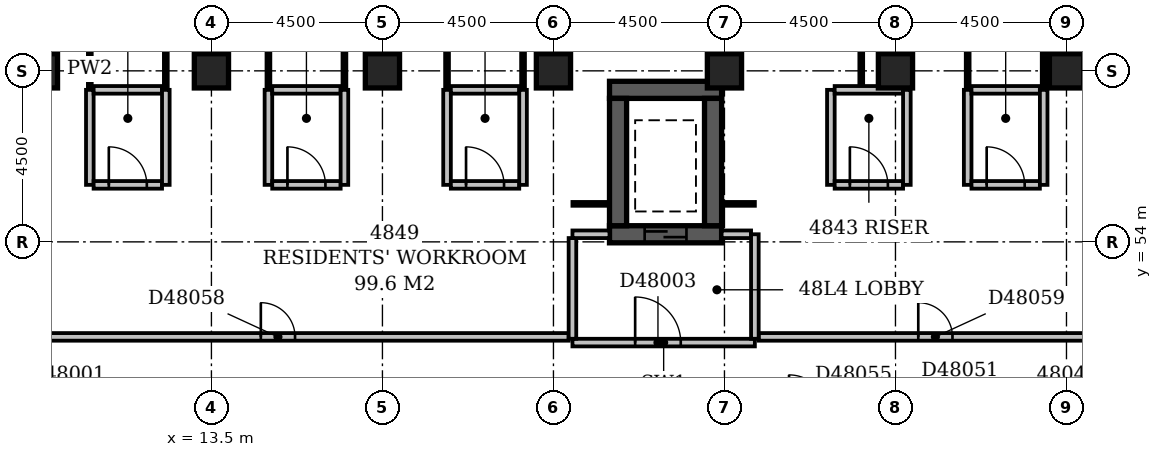
"""IFC4 building model, lengths in metres.
Left out: names, types, materials, properties, quantities, classifications, styles, units other than length and angle.
Written with IfcOpenShell. Run it as: python <this file> out.ifc"""

import sys

from ifc_helpers import new_model, si_unit, direction, frame, frame_2d, origin, origin_2d, place, context, subcontext, project, spatial, rectangle, extrude, element, fill, save


model = new_model("IFC4")
c1 = context("Model", 3, precision=1e-05, world=origin(), true_north=direction((0.0, 1.0)))
c2 = subcontext(c1, "Body", "Model", "MODEL_VIEW")
j1 = project(units=[si_unit("LENGTHUNIT", "METRE"), si_unit("PLANEANGLEUNIT", "RADIAN")], contexts=[c1])
p1 = place(None, origin())
s1 = spatial("IfcSite", under=j1, at=p1, CompositionType="ELEMENT")
p2 = place(p1, origin())
s2 = spatial("IfcBuilding", under=s1, at=p2, CompositionType="ELEMENT")
p3 = place(p2, frame((0.0, 0.0, 189.8)))
s3 = spatial("IfcBuildingStorey", under=s2, at=p3, CompositionType="ELEMENT", Elevation=189.8)
p4 = place(p3, frame((23.975, 54.2, -0.3), z_axis=(0.0, 0.0, 1.0), x_axis=(1.0, 0.0, 0.0)))
e1 = element("IfcWall", 1, at=p4, inside=s3, PredefinedType="SHEAR", context=c2, shape_type="SweptSolid", body=[
    extrude(rectangle(XDim=2.95, YDim=0.45, at=frame_2d((1.475, 0.0))), origin(), (0.0, 0.0, 1.0), 3.6),
])
p5 = place(p4, frame((0.925, 0.0, 0.3)))
e2 = element("IfcOpeningElement", 2, at=p5, cuts=e1, PredefinedType="OPENING", context=c2, shape_type="SweptSolid", body=[
    extrude(rectangle(XDim=1.1, YDim=2.1, at=frame_2d((0.55, 1.05))), frame((0.0, 0.237, 0.0), z_axis=(0.0, -1.0, 0.0), x_axis=(1.0, 0.0, 0.0)), (0.0, 0.0, 1.0), 0.474),
])
p6 = place(p3, frame((23.975, 58.0, -0.3), z_axis=(0.0, 0.0, 1.0), x_axis=(1.0, 0.0, 0.0)))
e3 = element("IfcWall", 3, at=p6, inside=s3, PredefinedType="SHEAR", context=c2, shape_type="SweptSolid", body=[
    extrude(rectangle(XDim=2.95, YDim=0.45, at=frame_2d((1.475, 0.0))), origin(), (0.0, 0.0, 1.0), 3.6),
])
for number, where, z_axis, x_axis in (
    (4, (24.2, 54.425, -0.3), (0.0, 0.0, 1.0), (0.0, 1.0, 0.0)),
    (5, (26.7, 54.425, -0.3), (0.0, 0.0, 1.0), (0.0, 1.0, 0.0)),
):
    element("IfcWall", number, at=place(p3, frame(where, z_axis=z_axis, x_axis=x_axis)), inside=s3, PredefinedType="SHEAR", context=c2, shape_type="SweptSolid", body=[
        extrude(rectangle(XDim=3.35, YDim=0.45, at=frame_2d((1.675, 0.0))), origin(), (0.0, 0.0, 1.0), 3.6),
    ])
for number, where, z_axis, x_axis in (
    (6, (9.0, 58.5, -0.3), (0.0, 0.0, 1.0), (1.0, 0.0, 0.0)),
    (7, (13.5, 58.5, -0.3), (0.0, 0.0, 1.0), (1.0, 0.0, 0.0)),
    (8, (18.0, 58.5, -0.3), (0.0, 0.0, 1.0), (1.0, 0.0, 0.0)),
    (9, (22.5, 58.5, -0.3), (0.0, 0.0, 1.0), (1.0, 0.0, 0.0)),
    (10, (27.0, 58.5, -0.3), (0.0, 0.0, 1.0), (1.0, 0.0, 0.0)),
    (11, (31.5, 58.5, -0.3), (0.0, 0.0, 1.0), (1.0, 0.0, 0.0)),
    (12, (36.0, 58.5, -0.3), (0.0, 0.0, 1.0), (1.0, 0.0, 0.0)),
):
    element("IfcColumn", number, at=place(p3, frame(where, z_axis=z_axis, x_axis=x_axis)), inside=s3, PredefinedType="COLUMN", context=c2, shape_type="SweptSolid", body=[
        extrude(rectangle(XDim=0.9, YDim=0.9, at=origin_2d()), origin(), (0.0, 0.0, 1.0), 3.6),
    ])
p7 = place(p3, frame((23.0, 51.35, 0.0), z_axis=(0.0, 0.0, 1.0), x_axis=(1.0, 0.0, 0.0)))
e13 = element("IfcWall", 13, at=p7, inside=s3, PredefinedType="PARTITIONING", context=c2, shape_type="SweptSolid", body=[
    extrude(rectangle(XDim=4.8, YDim=0.2, at=frame_2d((2.4, 0.0))), origin(), (0.0, 0.0, 1.0), 3.3),
])
p8 = place(p7, frame((1.65, 0.0, 0.0)))
e14 = element("IfcOpeningElement", 14, at=p8, cuts=e13, PredefinedType="OPENING", context=c2, shape_type="SweptSolid", body=[
    extrude(rectangle(XDim=1.2, YDim=2.1, at=frame_2d((0.6, 1.05))), frame((0.0, 0.112, 0.0), z_axis=(0.0, -1.0, 0.0), x_axis=(1.0, 0.0, 0.0)), (0.0, 0.0, 1.0), 0.224),
])
p9 = place(p3, frame((27.8, 51.45, 0.0), z_axis=(0.0, 0.0, 1.0), x_axis=(0.0, 1.0, 0.0)))
e15 = element("IfcWall", 15, at=p9, inside=s3, PredefinedType="PARTITIONING", context=c2, shape_type="SweptSolid", body=[
    extrude(rectangle(XDim=2.75, YDim=0.2, at=frame_2d((1.375, 0.0))), origin(), (0.0, 0.0, 1.0), 3.3),
])
p10 = place(p3, frame((23.0, 54.2, 0.0), z_axis=(0.0, 0.0, 1.0), x_axis=(1.0, 0.0, 0.0)))
e16 = element("IfcWall", 16, at=p10, inside=s3, PredefinedType="PARTITIONING", context=c2, shape_type="SweptSolid", body=[
    extrude(rectangle(XDim=0.975, YDim=0.2, at=frame_2d((0.488, 0.0))), origin(), (0.0, 0.0, 1.0), 3.3),
])
p11 = place(p3, frame((26.925, 54.2, 0.0), z_axis=(0.0, 0.0, 1.0), x_axis=(1.0, 0.0, 0.0)))
e17 = element("IfcWall", 17, at=p11, inside=s3, PredefinedType="PARTITIONING", context=c2, shape_type="SweptSolid", body=[
    extrude(rectangle(XDim=0.775, YDim=0.2, at=frame_2d((0.387, 0.0))), origin(), (0.0, 0.0, 1.0), 3.3),
])
p12 = place(p3, frame((23.0, 51.45, 0.0), z_axis=(0.0, 0.0, 1.0), x_axis=(0.0, 1.0, 0.0)))
e18 = element("IfcWall", 18, at=p12, inside=s3, PredefinedType="PARTITIONING", context=c2, shape_type="SweptSolid", body=[
    extrude(rectangle(XDim=2.65, YDim=0.2, at=frame_2d((1.325, 0.0))), origin(), (0.0, 0.0, 1.0), 3.3),
])
p13 = place(p3, frame((7.6, 51.5, 0.0), z_axis=(0.0, 0.0, 1.0), x_axis=(1.0, 0.0, 0.0)))
e19 = element("IfcWall", 19, at=p13, inside=s3, PredefinedType="PARTITIONING", context=c2, shape_type="SweptSolid", body=[
    extrude(rectangle(XDim=15.3, YDim=0.2, at=frame_2d((7.65, 0.0))), origin(), (0.0, 0.0, 1.0), 3.3),
])
p14 = place(p13, frame((7.2, 0.0, 0.0)))
e20 = element("IfcOpeningElement", 20, at=p14, cuts=e19, PredefinedType="OPENING", context=c2, shape_type="SweptSolid", body=[
    extrude(rectangle(XDim=0.9, YDim=2.1, at=frame_2d((0.45, 1.05))), frame((0.0, 0.112, 0.0), z_axis=(0.0, -1.0, 0.0), x_axis=(1.0, 0.0, 0.0)), (0.0, 0.0, 1.0), 0.224),
])
p15 = place(p3, frame((27.9, 51.5, 0.0), z_axis=(0.0, 0.0, 1.0), x_axis=(1.0, 0.0, 0.0)))
e21 = element("IfcWall", 21, at=p15, inside=s3, PredefinedType="PARTITIONING", context=c2, shape_type="SweptSolid", body=[
    extrude(rectangle(XDim=9.3, YDim=0.2, at=frame_2d((4.65, 0.0))), origin(), (0.0, 0.0, 1.0), 3.3),
])
p16 = place(p15, frame((4.2, 0.0, 0.0)))
e22 = element("IfcOpeningElement", 22, at=p16, cuts=e21, PredefinedType="OPENING", context=c2, shape_type="SweptSolid", body=[
    extrude(rectangle(XDim=0.9, YDim=2.1, at=frame_2d((0.45, 1.05))), frame((0.0, 0.112, 0.0), z_axis=(0.0, -1.0, 0.0), x_axis=(1.0, 0.0, 0.0)), (0.0, 0.0, 1.0), 0.224),
])
p17 = place(p3, frame((23.0, 55.0, 0.0), z_axis=(0.0, 0.0, 1.0), x_axis=(1.0, 0.0, 0.0)))
e23 = element("IfcWall", 23, at=p17, inside=s3, PredefinedType="PARTITIONING", context=c2, shape_type="SweptSolid", body=[
    extrude(rectangle(XDim=0.975, YDim=0.1, at=frame_2d((0.488, 0.0))), origin(), (0.0, 0.0, 1.0), 3.3),
])
p18 = place(p3, frame((26.925, 55.0, 0.0), z_axis=(0.0, 0.0, 1.0), x_axis=(1.0, 0.0, 0.0)))
e24 = element("IfcWall", 24, at=p18, inside=s3, PredefinedType="PARTITIONING", context=c2, shape_type="SweptSolid", body=[
    extrude(rectangle(XDim=0.875, YDim=0.1, at=frame_2d((0.438, 0.0))), origin(), (0.0, 0.0, 1.0), 3.3),
])
p19 = place(p3, frame((10.3, 55.5, 0.0), z_axis=(0.0, 0.0, 1.0), x_axis=(0.0, 1.0, 0.0)))
e25 = element("IfcWall", 25, at=p19, inside=s3, PredefinedType="PARTITIONING", context=c2, shape_type="SweptSolid", body=[
    extrude(rectangle(XDim=2.5, YDim=0.2, at=frame_2d((1.25, 0.0))), origin(), (0.0, 0.0, 1.0), 3.3),
])
p20 = place(p3, frame((10.4, 55.5, 0.0), z_axis=(0.0, 0.0, 1.0), x_axis=(1.0, 0.0, 0.0)))
e26 = element("IfcWall", 26, at=p20, inside=s3, PredefinedType="PARTITIONING", context=c2, shape_type="SweptSolid", body=[
    extrude(rectangle(XDim=1.8, YDim=0.2, at=frame_2d((0.9, 0.0))), origin(), (0.0, 0.0, 1.0), 3.3),
])
p21 = place(p20, frame((0.4, 0.0, 0.0)))
e27 = element("IfcOpeningElement", 27, at=p21, cuts=e26, PredefinedType="OPENING", context=c2, shape_type="SweptSolid", body=[
    extrude(rectangle(XDim=1.0, YDim=2.1, at=frame_2d((0.5, 1.05))), frame((0.0, 0.112, 0.0), z_axis=(0.0, -1.0, 0.0), x_axis=(1.0, 0.0, 0.0)), (0.0, 0.0, 1.0), 0.224),
])
for number, where, z_axis, x_axis in (
    (28, (12.3, 55.5, 0.0), (0.0, 0.0, 1.0), (0.0, 1.0, 0.0)),
    (29, (15.0, 55.5, 0.0), (0.0, 0.0, 1.0), (0.0, 1.0, 0.0)),
):
    element("IfcWall", number, at=place(p3, frame(where, z_axis=z_axis, x_axis=x_axis)), inside=s3, PredefinedType="PARTITIONING", context=c2, shape_type="SweptSolid", body=[
        extrude(rectangle(XDim=2.5, YDim=0.2, at=frame_2d((1.25, 0.0))), origin(), (0.0, 0.0, 1.0), 3.3),
    ])
p22 = place(p3, frame((15.1, 55.5, 0.0), z_axis=(0.0, 0.0, 1.0), x_axis=(1.0, 0.0, 0.0)))
e30 = element("IfcWall", 30, at=p22, inside=s3, PredefinedType="PARTITIONING", context=c2, shape_type="SweptSolid", body=[
    extrude(rectangle(XDim=1.8, YDim=0.2, at=frame_2d((0.9, 0.0))), origin(), (0.0, 0.0, 1.0), 3.3),
])
p23 = place(p22, frame((0.4, 0.0, 0.0)))
e31 = element("IfcOpeningElement", 31, at=p23, cuts=e30, PredefinedType="OPENING", context=c2, shape_type="SweptSolid", body=[
    extrude(rectangle(XDim=1.0, YDim=2.1, at=frame_2d((0.5, 1.05))), frame((0.0, 0.112, 0.0), z_axis=(0.0, -1.0, 0.0), x_axis=(1.0, 0.0, 0.0)), (0.0, 0.0, 1.0), 0.224),
])
for number, where, z_axis, x_axis in (
    (32, (17.0, 55.5, 0.0), (0.0, 0.0, 1.0), (0.0, 1.0, 0.0)),
    (33, (19.7, 55.5, 0.0), (0.0, 0.0, 1.0), (0.0, 1.0, 0.0)),
):
    element("IfcWall", number, at=place(p3, frame(where, z_axis=z_axis, x_axis=x_axis)), inside=s3, PredefinedType="PARTITIONING", context=c2, shape_type="SweptSolid", body=[
        extrude(rectangle(XDim=2.5, YDim=0.2, at=frame_2d((1.25, 0.0))), origin(), (0.0, 0.0, 1.0), 3.3),
    ])
p24 = place(p3, frame((19.8, 55.5, 0.0), z_axis=(0.0, 0.0, 1.0), x_axis=(1.0, 0.0, 0.0)))
e34 = element("IfcWall", 34, at=p24, inside=s3, PredefinedType="PARTITIONING", context=c2, shape_type="SweptSolid", body=[
    extrude(rectangle(XDim=1.8, YDim=0.2, at=frame_2d((0.9, 0.0))), origin(), (0.0, 0.0, 1.0), 3.3),
])
p25 = place(p24, frame((0.4, 0.0, 0.0)))
e35 = element("IfcOpeningElement", 35, at=p25, cuts=e34, PredefinedType="OPENING", context=c2, shape_type="SweptSolid", body=[
    extrude(rectangle(XDim=1.0, YDim=2.1, at=frame_2d((0.5, 1.05))), frame((0.0, 0.112, 0.0), z_axis=(0.0, -1.0, 0.0), x_axis=(1.0, 0.0, 0.0)), (0.0, 0.0, 1.0), 0.224),
])
for number, where, z_axis, x_axis in (
    (36, (21.7, 55.5, 0.0), (0.0, 0.0, 1.0), (0.0, 1.0, 0.0)),
    (37, (29.8, 55.5, 0.0), (0.0, 0.0, 1.0), (0.0, 1.0, 0.0)),
):
    element("IfcWall", number, at=place(p3, frame(where, z_axis=z_axis, x_axis=x_axis)), inside=s3, PredefinedType="PARTITIONING", context=c2, shape_type="SweptSolid", body=[
        extrude(rectangle(XDim=2.5, YDim=0.2, at=frame_2d((1.25, 0.0))), origin(), (0.0, 0.0, 1.0), 3.3),
    ])
p26 = place(p3, frame((29.9, 55.5, 0.0), z_axis=(0.0, 0.0, 1.0), x_axis=(1.0, 0.0, 0.0)))
e38 = element("IfcWall", 38, at=p26, inside=s3, PredefinedType="PARTITIONING", context=c2, shape_type="SweptSolid", body=[
    extrude(rectangle(XDim=1.8, YDim=0.2, at=frame_2d((0.9, 0.0))), origin(), (0.0, 0.0, 1.0), 3.3),
])
p27 = place(p26, frame((0.4, 0.0, 0.0)))
e39 = element("IfcOpeningElement", 39, at=p27, cuts=e38, PredefinedType="OPENING", context=c2, shape_type="SweptSolid", body=[
    extrude(rectangle(XDim=1.0, YDim=2.1, at=frame_2d((0.5, 1.05))), frame((0.0, 0.112, 0.0), z_axis=(0.0, -1.0, 0.0), x_axis=(1.0, 0.0, 0.0)), (0.0, 0.0, 1.0), 0.224),
])
for number, where, z_axis, x_axis in (
    (40, (31.8, 55.5, 0.0), (0.0, 0.0, 1.0), (0.0, 1.0, 0.0)),
    (41, (33.4, 55.5, 0.0), (0.0, 0.0, 1.0), (0.0, 1.0, 0.0)),
):
    element("IfcWall", number, at=place(p3, frame(where, z_axis=z_axis, x_axis=x_axis)), inside=s3, PredefinedType="PARTITIONING", context=c2, shape_type="SweptSolid", body=[
        extrude(rectangle(XDim=2.5, YDim=0.2, at=frame_2d((1.25, 0.0))), origin(), (0.0, 0.0, 1.0), 3.3),
    ])
p28 = place(p3, frame((33.5, 55.5, 0.0), z_axis=(0.0, 0.0, 1.0), x_axis=(1.0, 0.0, 0.0)))
e42 = element("IfcWall", 42, at=p28, inside=s3, PredefinedType="PARTITIONING", context=c2, shape_type="SweptSolid", body=[
    extrude(rectangle(XDim=1.8, YDim=0.2, at=frame_2d((0.9, 0.0))), origin(), (0.0, 0.0, 1.0), 3.3),
])
p29 = place(p28, frame((0.4, 0.0, 0.0)))
e43 = element("IfcOpeningElement", 43, at=p29, cuts=e42, PredefinedType="OPENING", context=c2, shape_type="SweptSolid", body=[
    extrude(rectangle(XDim=1.0, YDim=2.1, at=frame_2d((0.5, 1.05))), frame((0.0, 0.112, 0.0), z_axis=(0.0, -1.0, 0.0), x_axis=(1.0, 0.0, 0.0)), (0.0, 0.0, 1.0), 0.224),
])
p30 = place(p3, frame((35.4, 55.5, 0.0), z_axis=(0.0, 0.0, 1.0), x_axis=(0.0, 1.0, 0.0)))
e44 = element("IfcWall", 44, at=p30, inside=s3, PredefinedType="PARTITIONING", context=c2, shape_type="SweptSolid", body=[
    extrude(rectangle(XDim=2.5, YDim=0.2, at=frame_2d((1.25, 0.0))), origin(), (0.0, 0.0, 1.0), 2.4),
])
p31 = place(p3, frame((10.3, 58.0, 0.0), z_axis=(0.0, 0.0, 1.0), x_axis=(0.0, 1.0, 0.0)))
e45 = element("IfcWall", 45, at=p31, inside=s3, PredefinedType="PARTITIONING", context=c2, shape_type="SweptSolid", body=[
    extrude(rectangle(XDim=1.1, YDim=0.1, at=frame_2d((0.55, 0.0))), origin(), (0.0, 0.0, 1.0), 3.3),
])
p32 = place(p3, frame((10.4, 58.0, 0.0), z_axis=(0.0, 0.0, 1.0), x_axis=(1.0, 0.0, 0.0)))
e46 = element("IfcWall", 46, at=p32, inside=s3, PredefinedType="PARTITIONING", context=c2, shape_type="SweptSolid", body=[
    extrude(rectangle(XDim=1.8, YDim=0.2, at=frame_2d((0.9, 0.0))), origin(), (0.0, 0.0, 1.0), 3.3),
])
for number, where, z_axis, x_axis in (
    (47, (12.3, 58.0, 0.0), (0.0, 0.0, 1.0), (0.0, 1.0, 0.0)),
    (48, (15.0, 58.0, 0.0), (0.0, 0.0, 1.0), (0.0, 1.0, 0.0)),
):
    element("IfcWall", number, at=place(p3, frame(where, z_axis=z_axis, x_axis=x_axis)), inside=s3, PredefinedType="PARTITIONING", context=c2, shape_type="SweptSolid", body=[
        extrude(rectangle(XDim=1.1, YDim=0.1, at=frame_2d((0.55, 0.0))), origin(), (0.0, 0.0, 1.0), 3.3),
    ])
p33 = place(p3, frame((15.1, 58.0, 0.0), z_axis=(0.0, 0.0, 1.0), x_axis=(1.0, 0.0, 0.0)))
e49 = element("IfcWall", 49, at=p33, inside=s3, PredefinedType="PARTITIONING", context=c2, shape_type="SweptSolid", body=[
    extrude(rectangle(XDim=1.8, YDim=0.2, at=frame_2d((0.9, 0.0))), origin(), (0.0, 0.0, 1.0), 3.3),
])
for number, where, z_axis, x_axis in (
    (50, (17.0, 58.0, 0.0), (0.0, 0.0, 1.0), (0.0, 1.0, 0.0)),
    (51, (19.7, 58.0, 0.0), (0.0, 0.0, 1.0), (0.0, 1.0, 0.0)),
):
    element("IfcWall", number, at=place(p3, frame(where, z_axis=z_axis, x_axis=x_axis)), inside=s3, PredefinedType="PARTITIONING", context=c2, shape_type="SweptSolid", body=[
        extrude(rectangle(XDim=1.1, YDim=0.1, at=frame_2d((0.55, 0.0))), origin(), (0.0, 0.0, 1.0), 3.3),
    ])
p34 = place(p3, frame((19.8, 58.0, 0.0), z_axis=(0.0, 0.0, 1.0), x_axis=(1.0, 0.0, 0.0)))
e52 = element("IfcWall", 52, at=p34, inside=s3, PredefinedType="PARTITIONING", context=c2, shape_type="SweptSolid", body=[
    extrude(rectangle(XDim=1.8, YDim=0.2, at=frame_2d((0.9, 0.0))), origin(), (0.0, 0.0, 1.0), 3.3),
])
p35 = place(p3, frame((21.7, 58.0, 0.0), z_axis=(0.0, 0.0, 1.0), x_axis=(0.0, 1.0, 0.0)))
e53 = element("IfcWall", 53, at=p35, inside=s3, PredefinedType="PARTITIONING", context=c2, shape_type="SweptSolid", body=[
    extrude(rectangle(XDim=1.1, YDim=0.1, at=frame_2d((0.55, 0.0))), origin(), (0.0, 0.0, 1.0), 3.3),
])
p36 = place(p3, frame((29.9, 58.0, 0.0), z_axis=(0.0, 0.0, 1.0), x_axis=(1.0, 0.0, 0.0)))
e54 = element("IfcWall", 54, at=p36, inside=s3, PredefinedType="PARTITIONING", context=c2, shape_type="SweptSolid", body=[
    extrude(rectangle(XDim=1.8, YDim=0.2, at=frame_2d((0.9, 0.0))), origin(), (0.0, 0.0, 1.0), 3.3),
])
p37 = place(p3, frame((33.4, 58.0, 0.0), z_axis=(0.0, 0.0, 1.0), x_axis=(0.0, 1.0, 0.0)))
e55 = element("IfcWall", 55, at=p37, inside=s3, PredefinedType="PARTITIONING", context=c2, shape_type="SweptSolid", body=[
    extrude(rectangle(XDim=1.1, YDim=0.1, at=frame_2d((0.55, 0.0))), origin(), (0.0, 0.0, 1.0), 3.3),
])
p38 = place(p3, frame((33.5, 58.0, 0.0), z_axis=(0.0, 0.0, 1.0), x_axis=(1.0, 0.0, 0.0)))
e56 = element("IfcWall", 56, at=p38, inside=s3, PredefinedType="PARTITIONING", context=c2, shape_type="SweptSolid", body=[
    extrude(rectangle(XDim=1.8, YDim=0.2, at=frame_2d((0.9, 0.0))), origin(), (0.0, 0.0, 1.0), 3.3),
])
p39 = place(p3, frame((35.4, 58.0, 0.0), z_axis=(0.0, 0.0, 1.0), x_axis=(0.0, 1.0, 0.0)))
e57 = element("IfcWall", 57, at=p39, inside=s3, PredefinedType="PARTITIONING", context=c2, shape_type="SweptSolid", body=[
    extrude(rectangle(XDim=1.1, YDim=0.1, at=frame_2d((0.55, 0.0))), origin(), (0.0, 0.0, 1.0), 2.4),
])
p40 = place(p3, frame((30.6, 58.1, 0.0), z_axis=(0.0, 0.0, 1.0), x_axis=(0.0, 1.0, 0.0)))
e58 = element("IfcWall", 58, at=p40, inside=s3, PredefinedType="PARTITIONING", context=c2, shape_type="SweptSolid", body=[
    extrude(rectangle(XDim=1.0, YDim=0.1, at=frame_2d((0.5, 0.0))), origin(), (0.0, 0.0, 1.0), 3.3),
])
p41 = place(p8, origin())
e59 = element("IfcDoor", 59, at=p41, inside=s3, OperationType="SINGLE_SWING_LEFT", PredefinedType="DOOR", context=c2, shape_type="SweptSolid", body=[
    extrude(rectangle(XDim=1.2, YDim=2.1, at=frame_2d((0.6, 1.05))), frame((0.0, 0.025, 0.0), z_axis=(0.0, -1.0, 0.0), x_axis=(1.0, 0.0, 0.0)), (0.0, 0.0, 1.0), 0.05),
])
fill(e14, e59)
p42 = place(p5, origin())
e60 = element("IfcDoor", 60, at=p42, inside=s3, OperationType="SLIDING_TO_LEFT", PredefinedType="DOOR", context=c2, shape_type="SweptSolid", body=[
    extrude(rectangle(XDim=1.1, YDim=2.1, at=frame_2d((0.55, 1.05))), frame((0.0, 0.025, 0.0), z_axis=(0.0, -1.0, 0.0), x_axis=(1.0, 0.0, 0.0)), (0.0, 0.0, 1.0), 0.05),
])
fill(e2, e60)
p43 = place(p14, origin())
e61 = element("IfcDoor", 61, at=p43, inside=s3, OperationType="SINGLE_SWING_LEFT", PredefinedType="DOOR", context=c2, shape_type="SweptSolid", body=[
    extrude(rectangle(XDim=0.9, YDim=2.1, at=frame_2d((0.45, 1.05))), frame((0.0, 0.025, 0.0), z_axis=(0.0, -1.0, 0.0), x_axis=(1.0, 0.0, 0.0)), (0.0, 0.0, 1.0), 0.05),
])
fill(e20, e61)
p44 = place(p16, origin())
e62 = element("IfcDoor", 62, at=p44, inside=s3, OperationType="SINGLE_SWING_LEFT", PredefinedType="DOOR", context=c2, shape_type="SweptSolid", body=[
    extrude(rectangle(XDim=0.9, YDim=2.1, at=frame_2d((0.45, 1.05))), frame((0.0, 0.025, 0.0), z_axis=(0.0, -1.0, 0.0), x_axis=(1.0, 0.0, 0.0)), (0.0, 0.0, 1.0), 0.05),
])
fill(e22, e62)
p45 = place(p21, origin())
e63 = element("IfcDoor", 63, at=p45, inside=s3, OperationType="SINGLE_SWING_LEFT", PredefinedType="DOOR", context=c2, shape_type="SweptSolid", body=[
    extrude(rectangle(XDim=1.0, YDim=2.1, at=frame_2d((0.5, 1.05))), frame((0.0, 0.025, 0.0), z_axis=(0.0, -1.0, 0.0), x_axis=(1.0, 0.0, 0.0)), (0.0, 0.0, 1.0), 0.05),
])
fill(e27, e63)
p46 = place(p23, origin())
e64 = element("IfcDoor", 64, at=p46, inside=s3, OperationType="SINGLE_SWING_LEFT", PredefinedType="DOOR", context=c2, shape_type="SweptSolid", body=[
    extrude(rectangle(XDim=1.0, YDim=2.1, at=frame_2d((0.5, 1.05))), frame((0.0, 0.025, 0.0), z_axis=(0.0, -1.0, 0.0), x_axis=(1.0, 0.0, 0.0)), (0.0, 0.0, 1.0), 0.05),
])
fill(e31, e64)
p47 = place(p25, origin())
e65 = element("IfcDoor", 65, at=p47, inside=s3, OperationType="SINGLE_SWING_LEFT", PredefinedType="DOOR", context=c2, shape_type="SweptSolid", body=[
    extrude(rectangle(XDim=1.0, YDim=2.1, at=frame_2d((0.5, 1.05))), frame((0.0, 0.025, 0.0), z_axis=(0.0, -1.0, 0.0), x_axis=(1.0, 0.0, 0.0)), (0.0, 0.0, 1.0), 0.05),
])
fill(e35, e65)
p48 = place(p27, origin())
e66 = element("IfcDoor", 66, at=p48, inside=s3, OperationType="SINGLE_SWING_LEFT", PredefinedType="DOOR", context=c2, shape_type="SweptSolid", body=[
    extrude(rectangle(XDim=1.0, YDim=2.1, at=frame_2d((0.5, 1.05))), frame((0.0, 0.025, 0.0), z_axis=(0.0, -1.0, 0.0), x_axis=(1.0, 0.0, 0.0)), (0.0, 0.0, 1.0), 0.05),
])
fill(e39, e66)
p49 = place(p29, origin())
e67 = element("IfcDoor", 67, at=p49, inside=s3, OperationType="SINGLE_SWING_LEFT", PredefinedType="DOOR", context=c2, shape_type="SweptSolid", body=[
    extrude(rectangle(XDim=1.0, YDim=2.1, at=frame_2d((0.5, 1.05))), frame((0.0, 0.025, 0.0), z_axis=(0.0, -1.0, 0.0), x_axis=(1.0, 0.0, 0.0)), (0.0, 0.0, 1.0), 0.05),
])
fill(e43, e67)
save(model, sys.argv[1])
